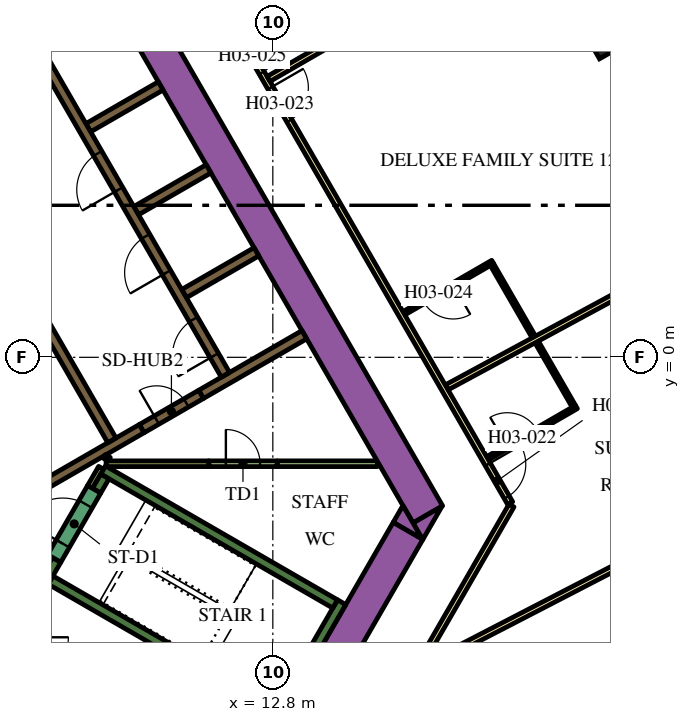
"""IFC4 building model, lengths in metres.
Left out: names, types, materials, properties, quantities, classifications, styles, units other than length and angle.
Written with IfcOpenShell. Run it as: python <this file> out.ifc"""

import sys

from ifc_helpers import new_model, si_unit, direction, frame, frame_2d, origin, origin_2d, place, context, subcontext, project, spatial, polyline, rectangle, outline, extrude, element, fill, save


model = new_model("IFC4")
c1 = context("Model", 3, precision=1e-05, world=origin(), true_north=direction((0.0, 1.0)))
c2 = subcontext(c1, "Body", "Model", "MODEL_VIEW")
j1 = project(units=[si_unit("LENGTHUNIT", "METRE"), si_unit("PLANEANGLEUNIT", "RADIAN")], contexts=[c1])
p1 = place(None, origin())
s1 = spatial("IfcSite", under=j1, at=p1, CompositionType="ELEMENT")
p2 = place(p1, origin())
s2 = spatial("IfcBuilding", under=s1, at=p2, CompositionType="ELEMENT")
p3 = place(p2, frame((0.0, 0.0, 54.9)))
s3 = spatial("IfcBuildingStorey", under=s2, at=p3, CompositionType="ELEMENT", Elevation=54.9)
p4 = place(p3, frame((21.443, 8.685, 0.0), z_axis=(0.0, 0.0, 1.0), x_axis=(-0.491973853463, 0.870609974391, 0.0)))
e1 = element("IfcColumn", 1, at=p4, inside=s3, PredefinedType="COLUMN", context=c2, shape_type="SweptSolid", body=[
    extrude(rectangle(XDim=1.4, YDim=0.9, at=origin_2d()), origin(), (0.0, 0.0, 1.0), 3.9),
])
p5 = place(p3, frame((6.776, 13.364, 0.0), z_axis=(0.0, 0.0, 1.0), x_axis=(0.500004177138, -0.8660229921, 0.0)))
e2 = element("IfcWall", 2, at=p5, inside=s3, PredefinedType="SOLIDWALL", context=c2, shape_type="SweptSolid", body=[
    extrude(rectangle(XDim=20.204, YDim=0.9, at=frame_2d((10.102, 0.0))), origin(), (0.0, 0.0, 1.0), 3.9),
])
p6 = place(p3, origin())
e3 = element("IfcWall", 3, at=p6, inside=s3, PredefinedType="SOLIDWALL", context=c2, shape_type="SweptSolid", body=[
    extrude(outline(polyline([(16.743, -4.8), (16.489, -4.36), (17.251, -3.92), (16.743, -4.8)])), origin(), (0.0, 0.0, 1.0), 3.9),
])
p7 = place(p3, frame((11.695, -12.644, 0.0), z_axis=(0.0, 0.0, 1.0), x_axis=(0.500010229568, 0.86601949766, 0.0)))
e4 = element("IfcWall", 4, at=p7, inside=s3, PredefinedType="SOLIDWALL", context=c2, shape_type="SweptSolid", body=[
    extrude(rectangle(XDim=9.326, YDim=0.9, at=frame_2d((4.663, 0.0))), origin(), (0.0, 0.0, 1.0), 3.9),
])
e5 = element("IfcWall", 5, at=p6, inside=s3, PredefinedType="SOLIDWALL", context=c2, shape_type="SweptSolid", body=[
    extrude(outline(polyline([(16.223, -3.9), (16.732, -4.78), (15.969, -4.34), (16.223, -3.9)])), origin(), (0.0, 0.0, 1.0), 3.9),
])
p8 = place(p3, frame((12.885, -9.431, 0.0), z_axis=(0.0, 0.0, 1.0), x_axis=(0.500020560727, 0.866013532718, 0.0)))
e6 = element("IfcWall", 6, at=p8, inside=s3, PredefinedType="SOLIDWALL", context=c2, shape_type="SweptSolid", body=[
    extrude(rectangle(XDim=3.45, YDim=0.25, at=frame_2d((1.725, 0.0))), origin(), (0.0, 0.0, 1.0), 3.9),
])
p9 = place(p3, frame((12.84, -9.261, 0.0), z_axis=(0.0, 0.0, 1.0), x_axis=(-0.866013990052, 0.500019768644, 0.0)))
e7 = element("IfcWall", 7, at=p9, inside=s3, PredefinedType="SOLIDWALL", context=c2, shape_type="SweptSolid", body=[
    extrude(rectangle(XDim=6.8, YDim=0.25, at=frame_2d((3.4, 0.0))), origin(), (0.0, 0.0, 1.0), 3.9),
])
p10 = place(p3, frame((7.113, -5.33, 0.0), z_axis=(0.0, 0.0, 1.0), x_axis=(-0.499965889992, -0.866045096311, 0.0)))
e8 = element("IfcWall", 8, at=p10, inside=s3, PredefinedType="SOLIDWALL", context=c2, shape_type="SweptSolid", body=[
    extrude(rectangle(XDim=0.666, YDim=0.25, at=frame_2d((0.333, 0.0))), origin(), (0.0, 0.0, 1.0), 3.9),
])
p11 = place(p3, frame((8.334, -2.964, 0.0), z_axis=(0.0, 0.0, 1.0), x_axis=(0.866016039709, -0.500016218704, 0.0)))
e9 = element("IfcWall", 9, at=p11, inside=s3, PredefinedType="SOLIDWALL", context=c2, shape_type="SweptSolid", body=[
    extrude(rectangle(XDim=7.05, YDim=0.25, at=frame_2d((3.525, 0.0))), origin(), (0.0, 0.0, 1.0), 3.9),
])
p12 = place(p3, frame((8.163, -3.511, 0.0), z_axis=(0.0, 0.0, 1.0), x_axis=(0.500127794843, 0.865951608824, 0.0)))
e10 = element("IfcWall", 10, at=p12, inside=s3, PredefinedType="SOLIDWALL", context=c2, shape_type="SweptSolid", body=[
    extrude(rectangle(XDim=0.435, YDim=0.25, at=frame_2d((0.217, 0.0))), origin(), (0.0, 0.0, 1.0), 3.9),
])
p13 = place(p3, frame((10.464, 1.677, 0.0), z_axis=(0.0, 0.0, 1.0), x_axis=(0.86605622881, 0.499946605688, 0.0)))
e11 = element("IfcWall", 11, at=p13, inside=s3, PredefinedType="SOLIDWALL", context=c2, shape_type="SweptSolid", body=[
    extrude(rectangle(XDim=2.2, YDim=0.25, at=frame_2d((1.1, 0.0))), origin(), (0.0, 0.0, 1.0), 3.9),
])
p14 = place(p3, frame((9.352, -1.875, 0.0), z_axis=(0.0, 0.0, 1.0), x_axis=(-0.866024844342, -0.500000968981, 0.0)))
e12 = element("IfcWall", 12, at=p14, inside=s3, PredefinedType="SOLIDWALL", context=c2, shape_type="SweptSolid", body=[
    extrude(rectangle(XDim=3.162, YDim=0.25, at=frame_2d((1.581, 0.0))), origin(), (0.0, 0.0, 1.0), 3.9),
])
for number, where, z_axis, x_axis in (
    (13, (7.944, 6.041, 0.0), (0.0, 0.0, 1.0), (0.866, 0.5, 0.0)),
    (14, (9.204, 3.859, 0.0), (0.0, 0.0, 1.0), (0.866, 0.5, 0.0)),
):
    element("IfcWall", number, at=place(p3, frame(where, z_axis=z_axis, x_axis=x_axis)), inside=s3, PredefinedType="SOLIDWALL", context=c2, shape_type="SweptSolid", body=[
        extrude(rectangle(XDim=2.2, YDim=0.25, at=frame_2d((1.1, 0.0))), origin(), (0.0, 0.0, 1.0), 3.9),
    ])
p15 = place(p3, frame((10.911, -0.975, 0.0), z_axis=(0.0, 0.0, 1.0), x_axis=(0.866046979468, 0.499962627957, 0.0)))
e15 = element("IfcWall", 15, at=p15, inside=s3, PredefinedType="SOLIDWALL", context=c2, shape_type="SweptSolid", body=[
    extrude(rectangle(XDim=3.138, YDim=0.25, at=frame_2d((1.569, 0.0))), origin(), (0.0, 0.0, 1.0), 3.9),
])
p16 = place(p3, frame((8.412, -2.8, 0.0), z_axis=(0.0, 0.0, 1.0), x_axis=(1.0, 0.0, 0.0)))
e16 = element("IfcWall", 16, at=p16, inside=s3, PredefinedType="PARTITIONING", context=c2, shape_type="SweptSolid", body=[
    extrude(rectangle(XDim=2.702, YDim=0.15, at=frame_2d((1.351, 0.0))), origin(), (0.0, 0.0, 1.0), 3.9),
])
p17 = place(p3, frame((8.459, -2.599, 0.0), z_axis=(0.0, 0.0, 1.0), x_axis=(-0.501919277433, -0.864914469148, 0.0)))
e17 = element("IfcWall", 17, at=p17, inside=s3, PredefinedType="PARTITIONING", context=c2, shape_type="SweptSolid", body=[
    extrude(rectangle(XDim=0.109, YDim=0.15, at=frame_2d((0.054, 0.0))), origin(), (0.0, 0.0, 1.0), 3.9),
])
p18 = place(p3, frame((8.281, -2.907, 0.0), z_axis=(0.0, 0.0, 1.0), x_axis=(-0.500193841991, -0.86591346013, 0.0)))
e18 = element("IfcWall", 18, at=p18, inside=s3, PredefinedType="PARTITIONING", context=c2, shape_type="SweptSolid", body=[
    extrude(rectangle(XDim=0.583, YDim=0.15, at=frame_2d((0.292, 0.0))), origin(), (0.0, 0.0, 1.0), 3.9),
])
p19 = place(p3, frame((12.915, -2.8, 0.0), z_axis=(0.0, 0.0, 1.0), x_axis=(1.0, 0.0, 0.0)))
e19 = element("IfcWall", 19, at=p19, inside=s3, PredefinedType="PARTITIONING", context=c2, shape_type="SweptSolid", body=[
    extrude(rectangle(XDim=2.637, YDim=0.15, at=frame_2d((1.318, 0.0))), origin(), (0.0, 0.0, 1.0), 2.75),
])
p20 = place(p3, frame((11.553, -0.46, 0.0), z_axis=(0.0, 0.0, 1.0), x_axis=(-0.500006514828, 0.866021642414, 0.0)))
e20 = element("IfcWall", 20, at=p20, inside=s3, PredefinedType="SOLIDWALL", context=c2, shape_type="SweptSolid", body=[
    extrude(rectangle(XDim=12.35, YDim=0.25, at=frame_2d((6.175, 0.0))), origin(), (0.0, 0.0, 1.0), 3.9),
])
p21 = place(p20, frame((0.585, 0.0, 0.0)))
e21 = element("IfcOpeningElement", 21, at=p21, cuts=e20, PredefinedType="OPENING", context=c2, shape_type="SweptSolid", body=[
    extrude(rectangle(XDim=1.1, YDim=2.1, at=frame_2d((0.55, 1.05))), frame((0.0, 0.135, 0.0), z_axis=(0.0, -1.0, 0.0), x_axis=(1.0, 0.0, 0.0)), (0.0, 0.0, 1.0), 0.27),
])
p22 = place(p20, frame((3.105, 0.0, 0.0)))
e22 = element("IfcOpeningElement", 22, at=p22, cuts=e20, PredefinedType="OPENING", context=c2, shape_type="SweptSolid", body=[
    extrude(rectangle(XDim=1.1, YDim=2.1, at=frame_2d((0.55, 1.05))), frame((0.0, 0.135, 0.0), z_axis=(0.0, -1.0, 0.0), x_axis=(1.0, 0.0, 0.0)), (0.0, 0.0, 1.0), 0.27),
])
p23 = place(p20, frame((5.625, 0.0, 0.0)))
e23 = element("IfcOpeningElement", 23, at=p23, cuts=e20, PredefinedType="OPENING", context=c2, shape_type="SweptSolid", body=[
    extrude(rectangle(XDim=1.1, YDim=2.1, at=frame_2d((0.55, 1.05))), frame((0.0, 0.135, 0.0), z_axis=(0.0, -1.0, 0.0), x_axis=(1.0, 0.0, 0.0)), (0.0, 0.0, 1.0), 0.27),
])
p24 = place(p3, frame((8.565, -2.185, 0.0), z_axis=(0.0, 0.0, 1.0), x_axis=(-0.499997954832, 0.866026584559, 0.0)))
e24 = element("IfcWall", 24, at=p24, inside=s3, PredefinedType="SOLIDWALL", context=c2, shape_type="SweptSolid", body=[
    extrude(rectangle(XDim=12.35, YDim=0.25, at=frame_2d((6.175, 0.0))), origin(), (0.0, 0.0, 1.0), 3.9),
])
p25 = place(p24, frame((5.725, 0.0, 0.0)))
e25 = element("IfcOpeningElement", 25, at=p25, cuts=e24, PredefinedType="OPENING", context=c2, shape_type="SweptSolid", body=[
    extrude(rectangle(XDim=0.9, YDim=2.1, at=frame_2d((0.45, 1.05))), frame((0.0, 0.135, 0.0), z_axis=(0.0, -1.0, 0.0), x_axis=(1.0, 0.0, 0.0)), (0.0, 0.0, 1.0), 0.27),
])
p26 = place(p3, frame((7.048, -5.292, 0.0), z_axis=(0.0, 0.0, 1.0), x_axis=(0.49994051562, 0.866059744384, 0.0)))
e26 = element("IfcWall", 26, at=p26, inside=s3, PredefinedType="SOLIDWALL", context=c2, shape_type="SweptSolid", body=[
    extrude(rectangle(XDim=2.1, YDim=0.4, at=frame_2d((1.05, 0.0))), origin(), (0.0, 0.0, 1.0), 3.9),
])
p27 = place(p26, frame((0.45, 0.0, 0.0)))
e27 = element("IfcOpeningElement", 27, at=p27, cuts=e26, PredefinedType="OPENING", context=c2, shape_type="SweptSolid", body=[
    extrude(rectangle(XDim=1.2, YDim=2.1, at=frame_2d((0.6, 1.05))), frame((0.0, 0.21, 0.0), z_axis=(0.0, -1.0, 0.0), x_axis=(1.0, 0.0, 0.0)), (0.0, 0.0, 1.0), 0.42),
])
p28 = place(p3, frame((9.352, -1.875, 0.0), z_axis=(0.0, 0.0, 1.0), x_axis=(0.865989075817, 0.500062916607, 0.0)))
e28 = element("IfcWall", 28, at=p28, inside=s3, PredefinedType="SOLIDWALL", context=c2, shape_type="SweptSolid", body=[
    extrude(rectangle(XDim=1.8, YDim=0.25, at=frame_2d((0.9, 0.0))), origin(), (0.0, 0.0, 1.0), 3.9),
])
p29 = place(p28, frame((0.45, 0.0, 0.0)))
e29 = element("IfcOpeningElement", 29, at=p29, cuts=e28, PredefinedType="OPENING", context=c2, shape_type="SweptSolid", body=[
    extrude(rectangle(XDim=0.9, YDim=2.1, at=frame_2d((0.45, 1.05))), frame((0.0, 0.135, 0.0), z_axis=(0.0, -1.0, 0.0), x_axis=(1.0, 0.0, 0.0)), (0.0, 0.0, 1.0), 0.27),
])
p30 = place(p3, frame((11.115, -2.8, 0.0), z_axis=(0.0, 0.0, 1.0), x_axis=(1.0, 0.0, 0.0)))
e30 = element("IfcWall", 30, at=p30, inside=s3, PredefinedType="PARTITIONING", context=c2, shape_type="SweptSolid", body=[
    extrude(rectangle(XDim=1.8, YDim=0.15, at=frame_2d((0.9, 0.0))), origin(), (0.0, 0.0, 1.0), 2.75),
])
p31 = place(p30, frame((0.45, 0.0, 0.0)))
e31 = element("IfcOpeningElement", 31, at=p31, cuts=e30, PredefinedType="OPENING", context=c2, shape_type="SweptSolid", body=[
    extrude(rectangle(XDim=0.9, YDim=2.1, at=frame_2d((0.45, 1.05))), frame((0.0, 0.085, 0.0), z_axis=(0.0, -1.0, 0.0), x_axis=(1.0, 0.0, 0.0)), (0.0, 0.0, 1.0), 0.17),
])
p32 = place(p3, frame((19.081, -3.9, 0.0), z_axis=(0.0, 0.0, 1.0), x_axis=(-0.499974327079, -0.866040225545, 0.0)))
e32 = element("IfcWall", 32, at=p32, inside=s3, PredefinedType="PARTITIONING", context=c2, shape_type="SweptSolid", body=[
    extrude(rectangle(XDim=5.258, YDim=0.15, at=frame_2d((2.629, 0.0))), origin(), (0.0, 0.0, 1.0), 2.75),
])
p33 = place(p3, frame((6.163, 18.475, 0.0), z_axis=(0.0, 0.0, 1.0), x_axis=(0.500001317485, -0.866024643133, 0.0)))
e33 = element("IfcWall", 33, at=p33, inside=s3, PredefinedType="PARTITIONING", context=c2, shape_type="SweptSolid", body=[
    extrude(rectangle(XDim=25.767, YDim=0.15, at=frame_2d((12.883, 0.0))), origin(), (0.0, 0.0, 1.0), 2.75),
])
p34 = place(p33, frame((24.586, 0.0, 0.0)))
e34 = element("IfcOpeningElement", 34, at=p34, cuts=e33, PredefinedType="OPENING", context=c2, shape_type="SweptSolid", body=[
    extrude(rectangle(XDim=1.0, YDim=2.1, at=frame_2d((0.5, 1.05))), frame((0.0, 0.085, 0.0), z_axis=(0.0, -1.0, 0.0), x_axis=(1.0, 0.0, 0.0)), (0.0, 0.0, 1.0), 0.17),
])
p35 = place(p33, frame((13.144, 0.0, 0.0)))
e35 = element("IfcOpeningElement", 35, at=p35, cuts=e33, PredefinedType="OPENING", context=c2, shape_type="SweptSolid", body=[
    extrude(rectangle(XDim=1.0, YDim=2.1, at=frame_2d((0.5, 1.05))), frame((0.0, 0.085, 0.0), z_axis=(0.0, -1.0, 0.0), x_axis=(1.0, 0.0, 0.0)), (0.0, 0.0, 1.0), 0.17),
])
p36 = place(p33, frame((11.692, 0.0, 0.0)))
e36 = element("IfcOpeningElement", 36, at=p36, cuts=e33, PredefinedType="OPENING", context=c2, shape_type="SweptSolid", body=[
    extrude(rectangle(XDim=1.0, YDim=2.1, at=frame_2d((0.5, 1.05))), frame((0.0, 0.085, 0.0), z_axis=(0.0, -1.0, 0.0), x_axis=(1.0, 0.0, 0.0)), (0.0, 0.0, 1.0), 0.17),
])
p37 = place(p33, frame((0.572, 0.0, 0.0)))
e37 = element("IfcOpeningElement", 37, at=p37, cuts=e33, PredefinedType="OPENING", context=c2, shape_type="SweptSolid", body=[
    extrude(rectangle(XDim=1.0, YDim=2.1, at=frame_2d((0.5, 1.05))), frame((0.0, 0.085, 0.0), z_axis=(0.0, -1.0, 0.0), x_axis=(1.0, 0.0, 0.0)), (0.0, 0.0, 1.0), 0.17),
])
p38 = place(p3, frame((19.982, 11.537, 0.0), z_axis=(0.0, 0.0, 1.0), x_axis=(-0.866020994654, -0.500007636761, 0.0)))
e38 = element("IfcWall", 38, at=p38, inside=s3, PredefinedType="PARTITIONING", context=c2, shape_type="SweptSolid", body=[
    extrude(rectangle(XDim=8.423, YDim=0.15, at=frame_2d((4.211, 0.0))), origin(), (0.0, 0.0, 1.0), 2.75),
])
p39 = place(p3, frame((27.134, -2.779, 0.0), z_axis=(0.0, 0.0, 1.0), x_axis=(-0.8882049501, -0.459447457951, 0.0)))
e39 = element("IfcWall", 39, at=p39, inside=s3, PredefinedType="PARTITIONING", context=c2, shape_type="SweptSolid", body=[
    extrude(rectangle(XDim=11.638, YDim=0.15, at=frame_2d((5.819, 0.0))), origin(), (0.0, 0.0, 1.0), 2.75),
])
p40 = place(p3, frame((24.145, 2.871, 0.0), z_axis=(0.0, 0.0, 1.0), x_axis=(-0.879551725039, -0.475803281809, 0.0)))
e40 = element("IfcWall", 40, at=p40, inside=s3, PredefinedType="PARTITIONING", context=c2, shape_type="SweptSolid", body=[
    extrude(rectangle(XDim=7.688, YDim=0.15, at=frame_2d((3.844, 0.0))), origin(), (0.0, 0.0, 1.0), 2.75),
])
p41 = place(p3, frame((18.451, -2.657, 0.0), z_axis=(0.0, 0.0, 1.0), x_axis=(0.86599734893, 0.500048589285, 0.0)))
e41 = element("IfcWall", 41, at=p41, inside=s3, PredefinedType="PARTITIONING", context=c2, shape_type="SweptSolid", body=[
    extrude(rectangle(XDim=2.7, YDim=0.1, at=frame_2d((1.35, 0.0))), origin(), (0.0, 0.0, 1.0), 2.75),
])
p42 = place(p41, frame((0.6, 0.0, 0.0)))
e42 = element("IfcOpeningElement", 42, at=p42, cuts=e41, PredefinedType="OPENING", context=c2, shape_type="SweptSolid", body=[
    extrude(rectangle(XDim=0.9, YDim=2.1, at=frame_2d((0.45, 1.05))), frame((0.0, 0.06, 0.0), z_axis=(0.0, -1.0, 0.0), x_axis=(1.0, 0.0, 0.0)), (0.0, 0.0, 1.0), 0.12),
])
p43 = place(p3, frame((20.716, -1.281, 0.0), z_axis=(0.0, 0.0, 1.0), x_axis=(-0.499969367985, 0.866043088465, 0.0)))
e43 = element("IfcWall", 43, at=p43, inside=s3, PredefinedType="PARTITIONING", context=c2, shape_type="SweptSolid", body=[
    extrude(rectangle(XDim=1.94, YDim=0.1, at=frame_2d((0.97, 0.0))), origin(), (0.0, 0.0, 1.0), 2.75),
])
p44 = place(p3, frame((18.586, 2.509, 0.0), z_axis=(0.0, 0.0, 1.0), x_axis=(-0.866059108428, -0.4999416173, 0.0)))
e44 = element("IfcWall", 44, at=p44, inside=s3, PredefinedType="PARTITIONING", context=c2, shape_type="SweptSolid", body=[
    extrude(rectangle(XDim=2.7, YDim=0.1, at=frame_2d((1.35, 0.0))), origin(), (0.0, 0.0, 1.0), 2.75),
])
p45 = place(p44, frame((1.2, 0.0, 0.0)))
e45 = element("IfcOpeningElement", 45, at=p45, cuts=e44, PredefinedType="OPENING", context=c2, shape_type="SweptSolid", body=[
    extrude(rectangle(XDim=0.9, YDim=2.1, at=frame_2d((0.45, 1.05))), frame((0.0, 0.06, 0.0), z_axis=(0.0, -1.0, 0.0), x_axis=(1.0, 0.0, 0.0)), (0.0, 0.0, 1.0), 0.12),
])
p46 = place(p3, frame((18.567, 2.441, 0.0), z_axis=(0.0, 0.0, 1.0), x_axis=(0.499946605688, -0.86605622881, 0.0)))
e46 = element("IfcWall", 46, at=p46, inside=s3, PredefinedType="PARTITIONING", context=c2, shape_type="SweptSolid", body=[
    extrude(rectangle(XDim=2.2, YDim=0.1, at=frame_2d((1.1, 0.0))), origin(), (0.0, 0.0, 1.0), 2.75),
])
p47 = place(p21, origin())
e47 = element("IfcDoor", 47, at=p47, inside=s3, OperationType="DOUBLE_DOOR_SLIDING", PredefinedType="DOOR", context=c2, shape_type="SweptSolid", body=[
    extrude(rectangle(XDim=1.1, YDim=2.1, at=frame_2d((0.55, 1.05))), frame((0.0, 0.025, 0.0), z_axis=(0.0, -1.0, 0.0), x_axis=(1.0, 0.0, 0.0)), (0.0, 0.0, 1.0), 0.05),
])
fill(e21, e47)
p48 = place(p22, origin())
e48 = element("IfcDoor", 48, at=p48, inside=s3, OperationType="DOUBLE_DOOR_SLIDING", PredefinedType="DOOR", context=c2, shape_type="SweptSolid", body=[
    extrude(rectangle(XDim=1.1, YDim=2.1, at=frame_2d((0.55, 1.05))), frame((0.0, 0.025, 0.0), z_axis=(0.0, -1.0, 0.0), x_axis=(1.0, 0.0, 0.0)), (0.0, 0.0, 1.0), 0.05),
])
fill(e22, e48)
p49 = place(p23, origin())
e49 = element("IfcDoor", 49, at=p49, inside=s3, OperationType="DOUBLE_DOOR_SLIDING", PredefinedType="DOOR", context=c2, shape_type="SweptSolid", body=[
    extrude(rectangle(XDim=1.1, YDim=2.1, at=frame_2d((0.55, 1.05))), frame((0.0, 0.025, 0.0), z_axis=(0.0, -1.0, 0.0), x_axis=(1.0, 0.0, 0.0)), (0.0, 0.0, 1.0), 0.05),
])
fill(e23, e49)
p50 = place(p27, origin())
e50 = element("IfcDoor", 50, at=p50, inside=s3, OperationType="SINGLE_SWING_LEFT", PredefinedType="DOOR", context=c2, shape_type="SweptSolid", body=[
    extrude(rectangle(XDim=1.2, YDim=2.1, at=frame_2d((0.6, 1.05))), frame((0.0, 0.025, 0.0), z_axis=(0.0, -1.0, 0.0), x_axis=(1.0, 0.0, 0.0)), (0.0, 0.0, 1.0), 0.05),
])
fill(e27, e50)
p51 = place(p29, origin())
e51 = element("IfcDoor", 51, at=p51, inside=s3, OperationType="SINGLE_SWING_LEFT", PredefinedType="DOOR", context=c2, shape_type="SweptSolid", body=[
    extrude(rectangle(XDim=0.9, YDim=2.1, at=frame_2d((0.45, 1.05))), frame((0.0, 0.025, 0.0), z_axis=(0.0, -1.0, 0.0), x_axis=(1.0, 0.0, 0.0)), (0.0, 0.0, 1.0), 0.05),
])
fill(e29, e51)
p52 = place(p31, origin())
e52 = element("IfcDoor", 52, at=p52, inside=s3, OperationType="SINGLE_SWING_LEFT", PredefinedType="DOOR", context=c2, shape_type="SweptSolid", body=[
    extrude(rectangle(XDim=0.9, YDim=2.1, at=frame_2d((0.45, 1.05))), frame((0.0, 0.025, 0.0), z_axis=(0.0, -1.0, 0.0), x_axis=(1.0, 0.0, 0.0)), (0.0, 0.0, 1.0), 0.05),
])
fill(e31, e52)
p53 = place(p34, origin())
e53 = element("IfcDoor", 53, at=p53, inside=s3, OperationType="SINGLE_SWING_RIGHT", PredefinedType="DOOR", context=c2, shape_type="SweptSolid", body=[
    extrude(rectangle(XDim=1.0, YDim=2.1, at=frame_2d((0.5, 1.05))), frame((0.0, 0.025, 0.0), z_axis=(0.0, -1.0, 0.0), x_axis=(1.0, 0.0, 0.0)), (0.0, 0.0, 1.0), 0.05),
])
fill(e34, e53)
p54 = place(p42, origin())
e54 = element("IfcDoor", 54, at=p54, inside=s3, OperationType="SINGLE_SWING_LEFT", PredefinedType="DOOR", context=c2, shape_type="SweptSolid", body=[
    extrude(rectangle(XDim=0.9, YDim=2.1, at=frame_2d((0.45, 1.05))), frame((0.0, 0.025, 0.0), z_axis=(0.0, -1.0, 0.0), x_axis=(1.0, 0.0, 0.0)), (0.0, 0.0, 1.0), 0.05),
])
fill(e42, e54)
p55 = place(p35, origin())
e55 = element("IfcDoor", 55, at=p55, inside=s3, OperationType="SINGLE_SWING_LEFT", PredefinedType="DOOR", context=c2, shape_type="SweptSolid", body=[
    extrude(rectangle(XDim=1.0, YDim=2.1, at=frame_2d((0.5, 1.05))), frame((0.0, 0.025, 0.0), z_axis=(0.0, -1.0, 0.0), x_axis=(1.0, 0.0, 0.0)), (0.0, 0.0, 1.0), 0.05),
])
fill(e35, e55)
p56 = place(p45, origin())
e56 = element("IfcDoor", 56, at=p56, inside=s3, OperationType="SINGLE_SWING_RIGHT", PredefinedType="DOOR", context=c2, shape_type="SweptSolid", body=[
    extrude(rectangle(XDim=0.9, YDim=2.1, at=frame_2d((0.45, 1.05))), frame((0.0, 0.025, 0.0), z_axis=(0.0, -1.0, 0.0), x_axis=(1.0, 0.0, 0.0)), (0.0, 0.0, 1.0), 0.05),
])
fill(e45, e56)
p57 = place(p36, origin())
e57 = element("IfcDoor", 57, at=p57, inside=s3, OperationType="SINGLE_SWING_RIGHT", PredefinedType="DOOR", context=c2, shape_type="SweptSolid", body=[
    extrude(rectangle(XDim=1.0, YDim=2.1, at=frame_2d((0.5, 1.05))), frame((0.0, 0.025, 0.0), z_axis=(0.0, -1.0, 0.0), x_axis=(1.0, 0.0, 0.0)), (0.0, 0.0, 1.0), 0.05),
])
fill(e36, e57)
save(model, sys.argv[1])
